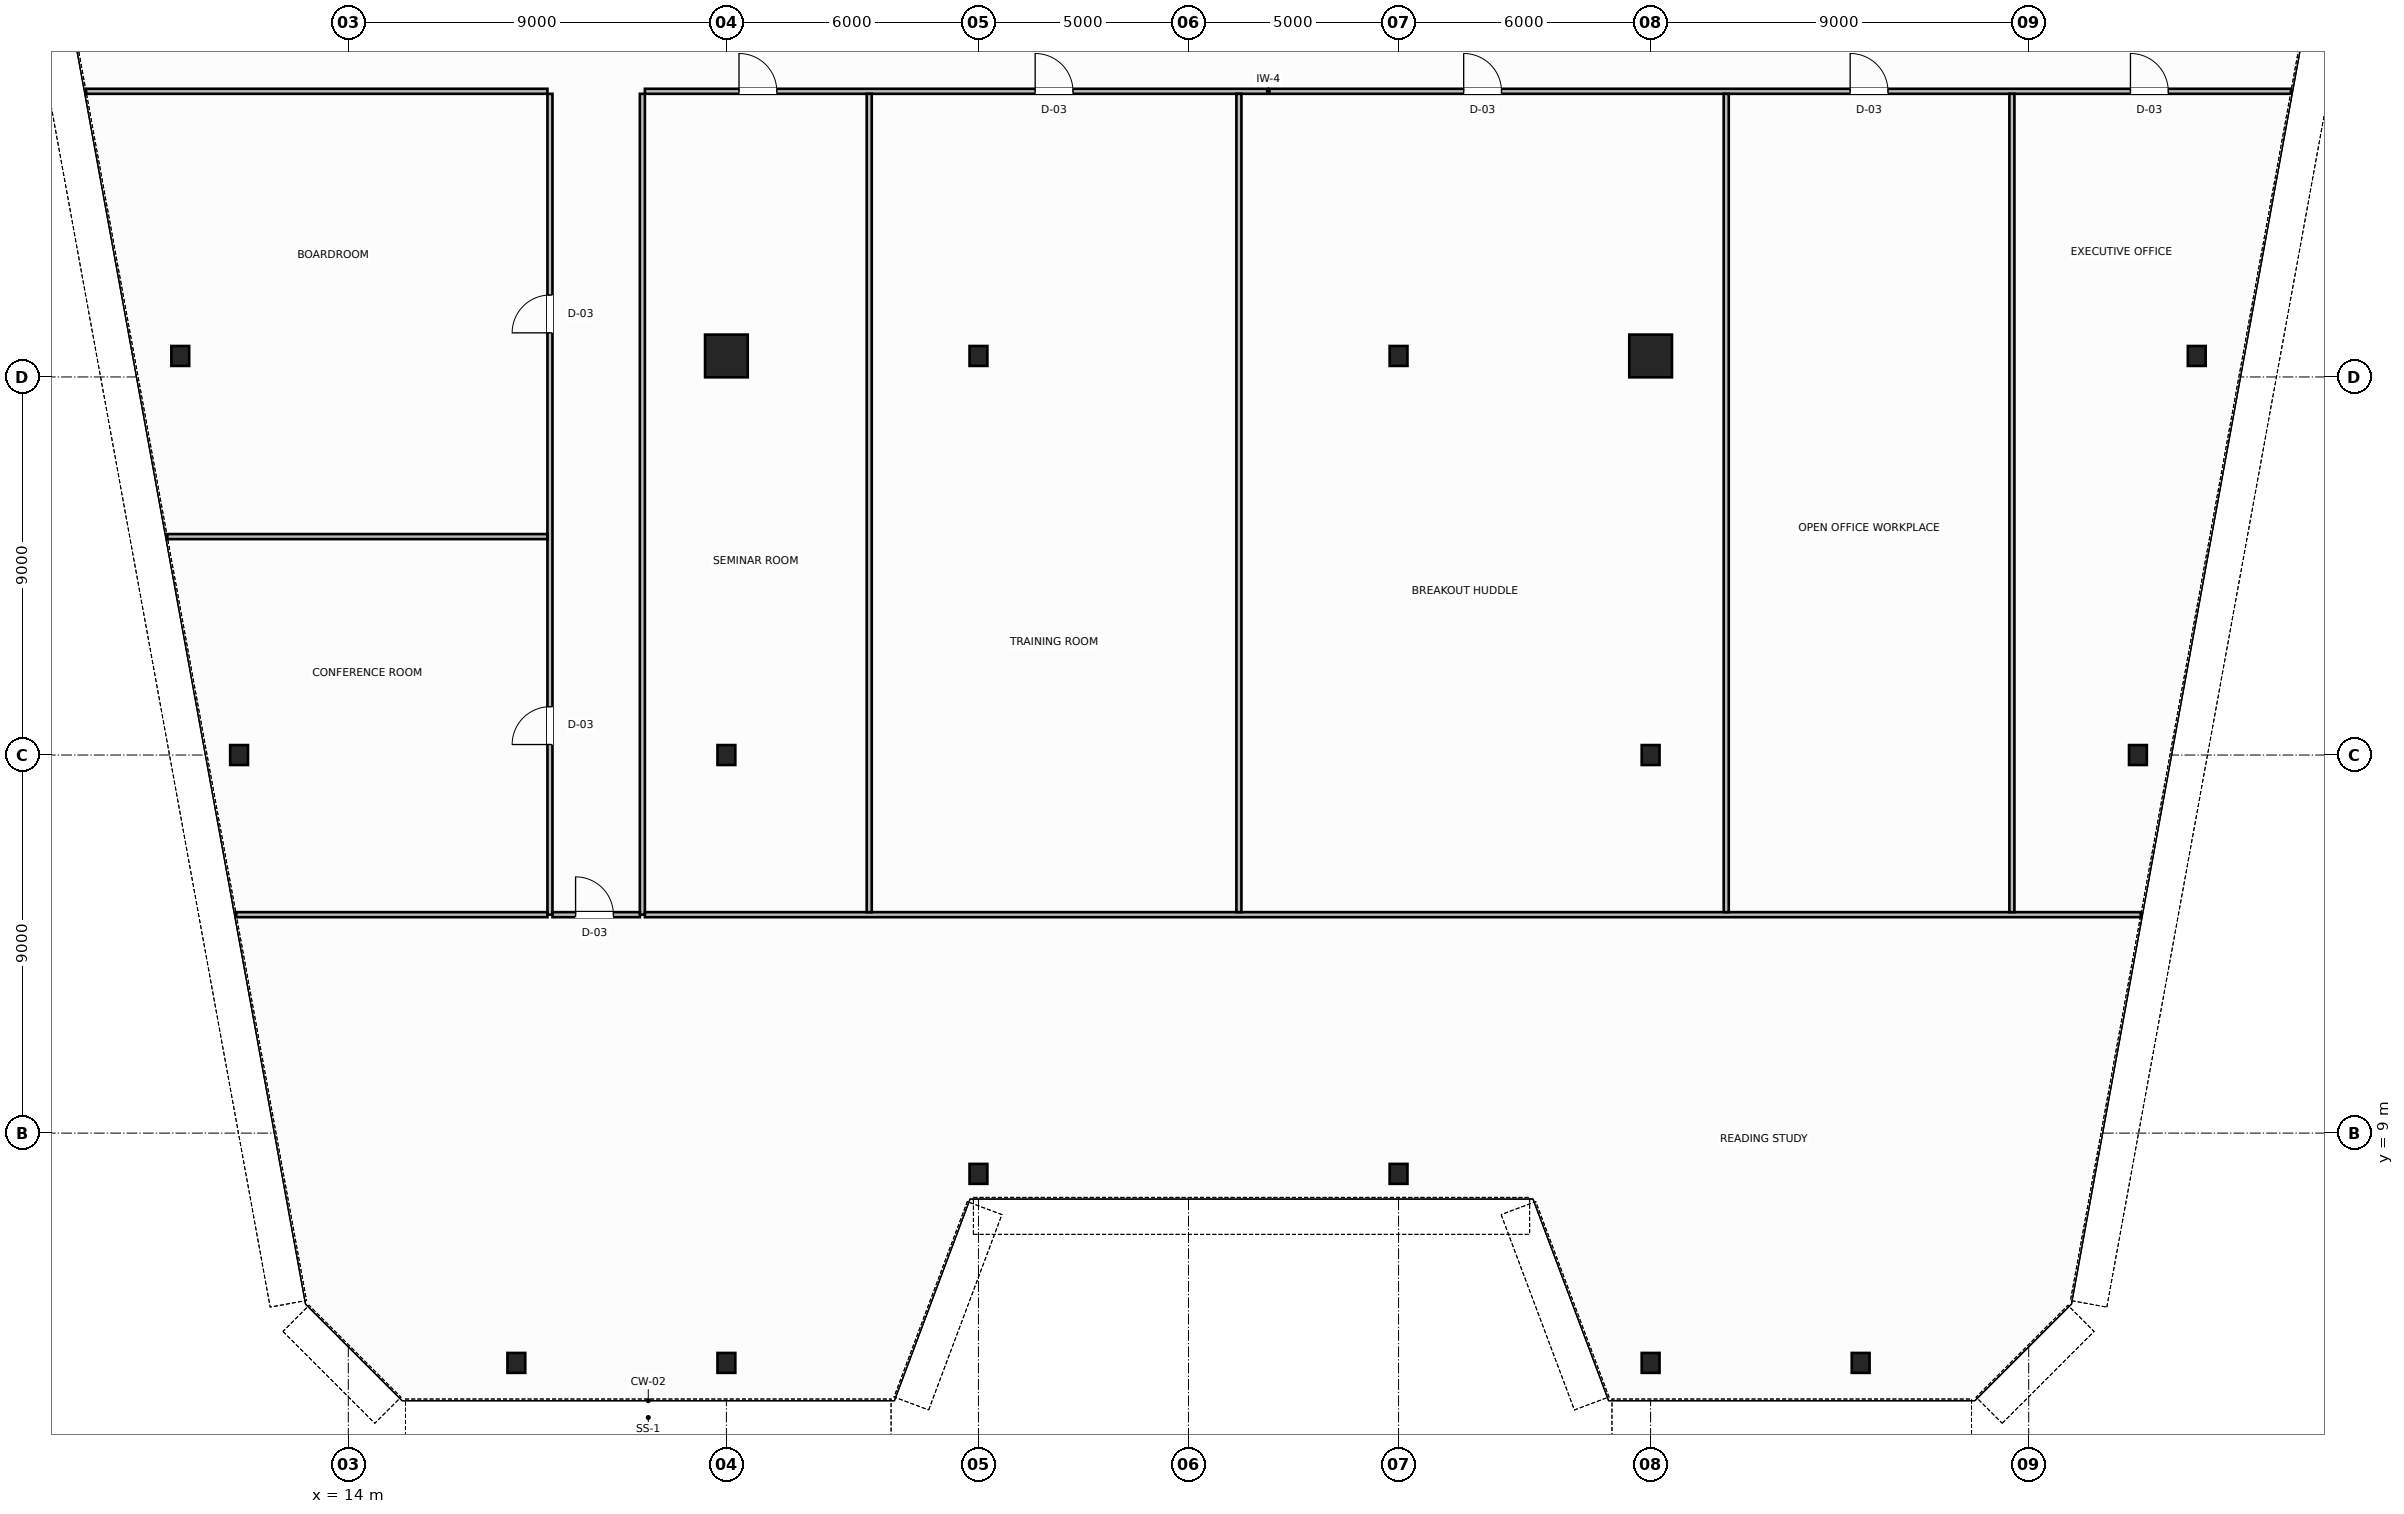
"""IFC4 building model, lengths in metres.
Left out: names, types, materials, properties, quantities, classifications, styles, units other than length and angle.
Written with IfcOpenShell. Run it as: python <this file> out.ifc"""

import sys

from ifc_helpers import new_model, si_unit, direction, frame, frame_2d, origin, origin_2d, place, context, subcontext, project, spatial, rectangle, hollow_circle, i_section, extrude, source, transform, mapped, element, fill, save


model = new_model("IFC4")
c1 = context("Model", 3, precision=1e-05, world=origin(), true_north=direction((0.0, 1.0)))
c2 = subcontext(c1, "Body", "Model", "MODEL_VIEW")
j1 = project(units=[si_unit("LENGTHUNIT", "METRE"), si_unit("PLANEANGLEUNIT", "RADIAN")], contexts=[c1])
p1 = place(None, origin())
s1 = spatial("IfcSite", under=j1, at=p1, CompositionType="ELEMENT")
p2 = place(p1, origin())
s2 = spatial("IfcBuilding", under=s1, at=p2, CompositionType="ELEMENT")
p3 = place(p2, frame((0.0, 0.0, 103.4)))
s3 = spatial("IfcBuildingStorey", under=s2, at=p3, CompositionType="ELEMENT", Elevation=103.4)
m1 = source(origin(), c2, "Body", "SweptSolid", [
    extrude(i_section(OverallWidth=0.424, OverallDepth=0.474, WebThickness=0.047, FlangeThickness=0.065, FilletRadius=0.015, at=origin_2d()), origin(), (0.0, 0.0, 1.0), 3.8),
])
for number, where, z_axis, x_axis in (
    (1, (10.0, 27.5, 0.0), (0.0, 0.0, 1.0), (1.0, 0.0, 0.0)),
    (2, (11.4, 18.0, 0.0), (0.0, 0.0, 1.0), (1.0, 0.0, 0.0)),
    (3, (58.0, 27.5, 0.0), (0.0, 0.0, 1.0), (1.0, 0.0, 0.0)),
    (4, (56.6, 18.0, 0.0), (0.0, 0.0, 1.0), (1.0, 0.0, 0.0)),
):
    element("IfcColumn", number, at=place(p3, frame(where, z_axis=z_axis, x_axis=x_axis)), inside=s3, PredefinedType="COLUMN", context=c2, shape_type="MappedRepresentation", body=[
        mapped(m1, transform((0.0, 0.0, 0.0), scale=1.0)),
    ])
m2 = source(origin(), c2, "Body", "SweptSolid", [
    extrude(hollow_circle(Radius=0.508, WallThickness=0.045, at=origin_2d()), origin(), (0.0, 0.0, 1.0), 3.8),
])
p4 = place(p3, frame((23.0, 27.5, 0.0), z_axis=(0.0, 0.0, 1.0), x_axis=(1.0, 0.0, 0.0)))
e5 = element("IfcColumn", 5, at=p4, inside=s3, PredefinedType="COLUMN", context=c2, shape_type="MappedRepresentation", body=[
    mapped(m2, transform((0.0, 0.0, 0.0), scale=1.0)),
])
m3 = source(origin(), c2, "Body", "SweptSolid", [
    extrude(i_section(OverallWidth=0.424, OverallDepth=0.474, WebThickness=0.047, FlangeThickness=0.065, FilletRadius=0.015, at=origin_2d()), origin(), (0.0, 0.0, 1.0), 3.8),
])
for number, where, z_axis, x_axis in (
    (6, (29.0, 27.5, 0.0), (0.0, 0.0, 1.0), (1.0, 0.0, 0.0)),
    (7, (39.0, 27.5, 0.0), (0.0, 0.0, 1.0), (1.0, 0.0, 0.0)),
):
    element("IfcColumn", number, at=place(p3, frame(where, z_axis=z_axis, x_axis=x_axis)), inside=s3, PredefinedType="COLUMN", context=c2, shape_type="MappedRepresentation", body=[
        mapped(m3, transform((0.0, 0.0, 0.0), scale=1.0)),
    ])
p5 = place(p3, frame((45.0, 27.5, 0.0), z_axis=(0.0, 0.0, 1.0), x_axis=(1.0, 0.0, 0.0)))
e8 = element("IfcColumn", 8, at=p5, inside=s3, PredefinedType="COLUMN", context=c2, shape_type="MappedRepresentation", body=[
    mapped(m2, transform((0.0, 0.0, 0.0), scale=1.0)),
])
for number, where, z_axis, x_axis in (
    (9, (23.0, 18.0, 0.0), (0.0, 0.0, 1.0), (1.0, 0.0, 0.0)),
    (10, (45.0, 18.0, 0.0), (0.0, 0.0, 1.0), (1.0, 0.0, 0.0)),
):
    element("IfcColumn", number, at=place(p3, frame(where, z_axis=z_axis, x_axis=x_axis)), inside=s3, PredefinedType="COLUMN", context=c2, shape_type="MappedRepresentation", body=[
        mapped(m3, transform((0.0, 0.0, 0.0), scale=1.0)),
    ])
m4 = source(origin(), c2, "Body", "SweptSolid", [
    extrude(i_section(OverallWidth=0.424, OverallDepth=0.474, WebThickness=0.047, FlangeThickness=0.065, FilletRadius=0.015, at=origin_2d()), origin(), (0.0, 0.0, 1.0), 3.744),
])
for number, where, z_axis, x_axis in (
    (11, (18.0, 3.53, 0.032), (0.0, -0.064, 0.998), (1.0, 0.0, 0.0)),
    (12, (23.0, 3.53, 0.032), (0.0, -0.064, 0.998), (1.0, 0.0, 0.0)),
    (13, (29.0, 8.03, 0.032), (0.0, -0.064, 0.998), (1.0, 0.0, 0.0)),
    (14, (39.0, 8.03, 0.032), (0.0, -0.064, 0.998), (1.0, 0.0, 0.0)),
    (15, (45.0, 3.53, 0.032), (0.0, -0.064, 0.998), (1.0, 0.0, 0.0)),
    (16, (50.0, 3.53, 0.032), (0.0, -0.064, 0.998), (1.0, 0.0, 0.0)),
):
    element("IfcColumn", number, at=place(p3, frame(where, z_axis=z_axis, x_axis=x_axis)), inside=s3, PredefinedType="COLUMN", context=c2, shape_type="MappedRepresentation", body=[
        mapped(m4, transform((0.0, 0.0, 0.0), scale=1.0)),
    ])
p6 = place(p3, frame((7.757, 33.8, 0.0), z_axis=(0.0, 0.0, 1.0), x_axis=(1.0, 0.0, 0.0)))
e17 = element("IfcWall", 17, at=p6, inside=s3, PredefinedType="PARTITIONING", context=c2, shape_type="SweptSolid", body=[
    extrude(rectangle(XDim=10.983, YDim=0.12, at=frame_2d((5.492, 0.0))), origin(), (0.0, 0.0, 1.0), 3.07),
])
p7 = place(p3, frame((21.06, 33.8, 0.0), z_axis=(0.0, 0.0, 1.0), x_axis=(1.0, 0.0, 0.0)))
e18 = element("IfcWall", 18, at=p7, inside=s3, PredefinedType="PARTITIONING", context=c2, shape_type="SweptSolid", body=[
    extrude(rectangle(XDim=39.183, YDim=0.12, at=frame_2d((19.592, 0.0))), origin(), (0.0, 0.0, 1.0), 3.07),
])
p8 = place(p7, frame((2.24, 0.0, 0.0)))
e19 = element("IfcOpeningElement", 19, at=p8, cuts=e18, PredefinedType="OPENING", context=c2, shape_type="SweptSolid", body=[
    extrude(rectangle(XDim=0.9, YDim=2.15, at=frame_2d((0.45, 1.075))), frame((0.0, 0.07, 0.0), z_axis=(0.0, -1.0, 0.0), x_axis=(1.0, 0.0, 0.0)), (0.0, 0.0, 1.0), 0.14),
])
p9 = place(p7, frame((9.29, 0.0, 0.0)))
e20 = element("IfcOpeningElement", 20, at=p9, cuts=e18, PredefinedType="OPENING", context=c2, shape_type="SweptSolid", body=[
    extrude(rectangle(XDim=0.9, YDim=2.15, at=frame_2d((0.45, 1.075))), frame((0.0, 0.07, 0.0), z_axis=(0.0, -1.0, 0.0), x_axis=(1.0, 0.0, 0.0)), (0.0, 0.0, 1.0), 0.14),
])
p10 = place(p7, frame((19.49, 0.0, 0.0)))
e21 = element("IfcOpeningElement", 21, at=p10, cuts=e18, PredefinedType="OPENING", context=c2, shape_type="SweptSolid", body=[
    extrude(rectangle(XDim=0.9, YDim=2.15, at=frame_2d((0.45, 1.075))), frame((0.0, 0.07, 0.0), z_axis=(0.0, -1.0, 0.0), x_axis=(1.0, 0.0, 0.0)), (0.0, 0.0, 1.0), 0.14),
])
p11 = place(p7, frame((28.69, 0.0, 0.0)))
e22 = element("IfcOpeningElement", 22, at=p11, cuts=e18, PredefinedType="OPENING", context=c2, shape_type="SweptSolid", body=[
    extrude(rectangle(XDim=0.9, YDim=2.15, at=frame_2d((0.45, 1.075))), frame((0.0, 0.07, 0.0), z_axis=(0.0, -1.0, 0.0), x_axis=(1.0, 0.0, 0.0)), (0.0, 0.0, 1.0), 0.14),
])
p12 = place(p7, frame((35.362, 0.0, 0.0)))
e23 = element("IfcOpeningElement", 23, at=p12, cuts=e18, PredefinedType="OPENING", context=c2, shape_type="SweptSolid", body=[
    extrude(rectangle(XDim=0.9, YDim=2.15, at=frame_2d((0.45, 1.075))), frame((0.0, 0.07, 0.0), z_axis=(0.0, -1.0, 0.0), x_axis=(1.0, 0.0, 0.0)), (0.0, 0.0, 1.0), 0.14),
])
p13 = place(p3, frame((18.8, 14.2, 0.0), z_axis=(0.0, 0.0, 1.0), x_axis=(0.0, 1.0, 0.0)))
e24 = element("IfcWall", 24, at=p13, inside=s3, PredefinedType="PARTITIONING", context=c2, shape_type="SweptSolid", body=[
    extrude(rectangle(XDim=19.54, YDim=0.12, at=frame_2d((9.77, 0.0))), origin(), (0.0, 0.0, 1.0), 3.58),
])
p14 = place(p13, frame((4.05, 0.0, 0.0)))
e25 = element("IfcOpeningElement", 25, at=p14, cuts=e24, PredefinedType="OPENING", context=c2, shape_type="SweptSolid", body=[
    extrude(rectangle(XDim=0.9, YDim=2.15, at=frame_2d((0.45, 1.075))), frame((0.0, 0.07, 0.0), z_axis=(0.0, -1.0, 0.0), x_axis=(1.0, 0.0, 0.0)), (0.0, 0.0, 1.0), 0.14),
])
p15 = place(p13, frame((13.85, 0.0, 0.0)))
e26 = element("IfcOpeningElement", 26, at=p15, cuts=e24, PredefinedType="OPENING", context=c2, shape_type="SweptSolid", body=[
    extrude(rectangle(XDim=0.9, YDim=2.15, at=frame_2d((0.45, 1.075))), frame((0.0, 0.07, 0.0), z_axis=(0.0, -1.0, 0.0), x_axis=(1.0, 0.0, 0.0)), (0.0, 0.0, 1.0), 0.14),
])
p16 = place(p3, frame((21.0, 14.2, 0.0), z_axis=(0.0, 0.0, 1.0), x_axis=(0.0, 1.0, 0.0)))
e27 = element("IfcWall", 27, at=p16, inside=s3, PredefinedType="PARTITIONING", context=c2, shape_type="SweptSolid", body=[
    extrude(rectangle(XDim=19.54, YDim=0.12, at=frame_2d((9.77, 0.0))), origin(), (0.0, 0.0, 1.0), 3.58),
])
p17 = place(p3, frame((18.86, 14.2, 0.0), z_axis=(0.0, 0.0, 1.0), x_axis=(1.0, 0.0, 0.0)))
e28 = element("IfcWall", 28, at=p17, inside=s3, PredefinedType="PARTITIONING", context=c2, shape_type="SweptSolid", body=[
    extrude(rectangle(XDim=2.08, YDim=0.12, at=frame_2d((1.04, 0.0))), origin(), (0.0, 0.0, 1.0), 3.58),
])
p18 = place(p17, frame((0.55, 0.0, 0.0)))
e29 = element("IfcOpeningElement", 29, at=p18, cuts=e28, PredefinedType="OPENING", context=c2, shape_type="SweptSolid", body=[
    extrude(rectangle(XDim=0.9, YDim=2.15, at=frame_2d((0.45, 1.075))), frame((0.0, 0.07, 0.0), z_axis=(0.0, -1.0, 0.0), x_axis=(1.0, 0.0, 0.0)), (0.0, 0.0, 1.0), 0.14),
])
p19 = place(p3, frame((11.331, 14.2, 0.0), z_axis=(0.0, 0.0, 1.0), x_axis=(1.0, 0.0, 0.0)))
e30 = element("IfcWall", 30, at=p19, inside=s3, PredefinedType="PARTITIONING", context=c2, shape_type="SweptSolid", body=[
    extrude(rectangle(XDim=7.409, YDim=0.12, at=frame_2d((3.705, 0.0))), origin(), (0.0, 0.0, 1.0), 3.58),
])
p20 = place(p3, frame((21.06, 14.2, 0.0), z_axis=(0.0, 0.0, 1.0), x_axis=(1.0, 0.0, 0.0)))
e31 = element("IfcWall", 31, at=p20, inside=s3, PredefinedType="PARTITIONING", context=c2, shape_type="SweptSolid", body=[
    extrude(rectangle(XDim=35.609, YDim=0.12, at=frame_2d((17.805, 0.0))), origin(), (0.0, 0.0, 1.0), 3.58),
])
p21 = place(p3, frame((9.69, 23.2, 0.0), z_axis=(0.0, 0.0, 1.0), x_axis=(1.0, 0.0, 0.0)))
e32 = element("IfcWall", 32, at=p21, inside=s3, PredefinedType="PARTITIONING", context=c2, shape_type="SweptSolid", body=[
    extrude(rectangle(XDim=9.05, YDim=0.12, at=frame_2d((4.525, 0.0))), origin(), (0.0, 0.0, 1.0), 3.58),
])
for number, where, z_axis, x_axis in (
    (33, (26.4, 14.26, 0.0), (0.0, 0.0, 1.0), (0.0, 1.0, 0.0)),
    (34, (35.2, 14.26, 0.0), (0.0, 0.0, 1.0), (0.0, 1.0, 0.0)),
    (35, (46.8, 14.26, 0.0), (0.0, 0.0, 1.0), (0.0, 1.0, 0.0)),
    (36, (53.6, 14.26, 0.0), (0.0, 0.0, 1.0), (0.0, 1.0, 0.0)),
):
    element("IfcWall", number, at=place(p3, frame(where, z_axis=z_axis, x_axis=x_axis)), inside=s3, PredefinedType="PARTITIONING", context=c2, shape_type="SweptSolid", body=[
        extrude(rectangle(XDim=19.48, YDim=0.12, at=frame_2d((9.74, 0.0))), origin(), (0.0, 0.0, 1.0), 3.58),
    ])
m5 = source(origin(), c2, "Body", "SweptSolid", [
    extrude(rectangle(XDim=0.9, YDim=2.15, at=frame_2d((0.45, 1.075))), frame((0.0, 0.025, 0.0), z_axis=(0.0, -1.0, 0.0), x_axis=(1.0, 0.0, 0.0)), (0.0, 0.0, 1.0), 0.05),
])
p22 = place(p18, origin())
e37 = element("IfcDoor", 37, at=p22, inside=s3, OperationType="SINGLE_SWING_LEFT", PredefinedType="DOOR", context=c2, shape_type="MappedRepresentation", body=[
    mapped(m5, transform((0.0, 0.0, 0.0), scale=1.0)),
])
fill(e29, e37)
p23 = place(p14, origin())
e38 = element("IfcDoor", 38, at=p23, inside=s3, OperationType="SINGLE_SWING_LEFT", PredefinedType="DOOR", context=c2, shape_type="MappedRepresentation", body=[
    mapped(m5, transform((0.0, 0.0, 0.0), scale=1.0)),
])
fill(e25, e38)
p24 = place(p15, origin())
e39 = element("IfcDoor", 39, at=p24, inside=s3, OperationType="SINGLE_SWING_RIGHT", PredefinedType="DOOR", context=c2, shape_type="MappedRepresentation", body=[
    mapped(m5, transform((0.0, 0.0, 0.0), scale=1.0)),
])
fill(e26, e39)
p25 = place(p8, origin())
e40 = element("IfcDoor", 40, at=p25, inside=s3, OperationType="SINGLE_SWING_RIGHT", PredefinedType="DOOR", context=c2, shape_type="MappedRepresentation", body=[
    mapped(m5, transform((0.0, 0.0, 0.0), scale=1.0)),
])
fill(e19, e40)
p26 = place(p9, origin())
e41 = element("IfcDoor", 41, at=p26, inside=s3, OperationType="SINGLE_SWING_LEFT", PredefinedType="DOOR", context=c2, shape_type="MappedRepresentation", body=[
    mapped(m5, transform((0.0, 0.0, 0.0), scale=1.0)),
])
fill(e20, e41)
p27 = place(p10, origin())
e42 = element("IfcDoor", 42, at=p27, inside=s3, OperationType="SINGLE_SWING_RIGHT", PredefinedType="DOOR", context=c2, shape_type="MappedRepresentation", body=[
    mapped(m5, transform((0.0, 0.0, 0.0), scale=1.0)),
])
fill(e21, e42)
p28 = place(p11, origin())
e43 = element("IfcDoor", 43, at=p28, inside=s3, OperationType="SINGLE_SWING_LEFT", PredefinedType="DOOR", context=c2, shape_type="MappedRepresentation", body=[
    mapped(m5, transform((0.0, 0.0, 0.0), scale=1.0)),
])
fill(e22, e43)
p29 = place(p12, origin())
e44 = element("IfcDoor", 44, at=p29, inside=s3, OperationType="SINGLE_SWING_RIGHT", PredefinedType="DOOR", context=c2, shape_type="MappedRepresentation", body=[
    mapped(m5, transform((0.0, 0.0, 0.0), scale=1.0)),
])
fill(e23, e44)
save(model, sys.argv[1])
